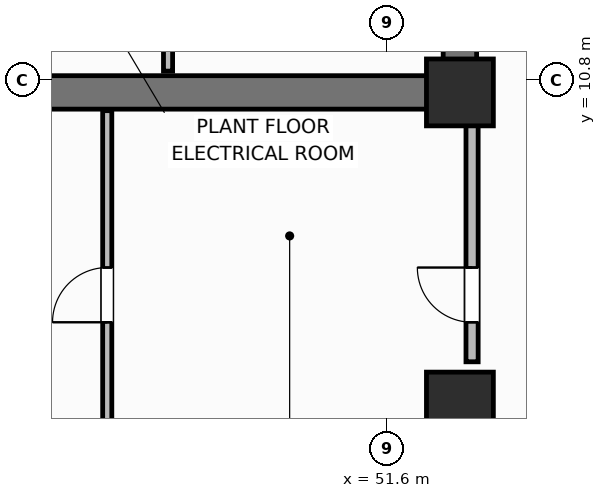
"""IFC4 building model, lengths in metres.
Left out: names, types, materials, properties, quantities, classifications, styles, units other than length and angle.
Written with IfcOpenShell. Run it as: python <this file> out.ifc"""

import sys

from ifc_helpers import new_model, si_unit, direction, frame, frame_2d, origin, origin_2d, place, context, subcontext, project, spatial, rectangle, extrude, element, fill, save


model = new_model("IFC4")
c1 = context("Model", 3, precision=1e-05, world=origin(), true_north=direction((0.0, 1.0)))
c2 = subcontext(c1, "Body", "Model", "MODEL_VIEW")
j1 = project(units=[si_unit("LENGTHUNIT", "METRE"), si_unit("PLANEANGLEUNIT", "RADIAN")], contexts=[c1])
p1 = place(None, origin())
s1 = spatial("IfcSite", under=j1, at=p1, CompositionType="ELEMENT")
p2 = place(p1, origin())
s2 = spatial("IfcBuilding", under=s1, at=p2, CompositionType="ELEMENT")
p3 = place(p2, frame((0.0, 0.0, 129.0)))
s3 = spatial("IfcBuildingStorey", under=s2, at=p3, CompositionType="ELEMENT", Elevation=129.0)
p4 = place(p3, frame((52.8, 10.6, 0.0), z_axis=(0.0, 0.0, 1.0), x_axis=(-1.0, 0.0, 0.0)))
e1 = element("IfcWall", 1, at=p4, inside=s3, PredefinedType="SHEAR", context=c2, shape_type="SweptSolid", body=[
    extrude(rectangle(XDim=27.2, YDim=0.55, at=frame_2d((13.6, 0.0))), origin(), (0.0, 0.0, 1.0), 3.7),
])
p5 = place(p3, frame((52.8, 10.875, 0.0), z_axis=(0.0, 0.0, 1.0), x_axis=(0.0, 1.0, 0.0)))
e2 = element("IfcWall", 2, at=p5, inside=s3, PredefinedType="SHEAR", context=c2, shape_type="SweptSolid", body=[
    extrude(rectangle(XDim=5.65, YDim=0.55, at=frame_2d((2.825, 0.0))), origin(), (0.0, 0.0, 1.0), 3.7),
])
for number, where, z_axis, x_axis in (
    (3, (52.8, 10.6, 0.0), (0.0, 0.0, 1.0), (1.0, 0.0, 0.0)),
    (4, (52.8, 5.45, 0.0), (0.0, 0.0, 1.0), (1.0, 0.0, 0.0)),
):
    element("IfcColumn", number, at=place(p3, frame(where, z_axis=z_axis, x_axis=x_axis)), inside=s3, PredefinedType="COLUMN", context=c2, shape_type="SweptSolid", body=[
        extrude(rectangle(XDim=1.1, YDim=1.1, at=origin_2d()), origin(), (0.0, 0.0, 1.0), 3.7),
    ])
p6 = place(p3, frame((48.0, 10.95, 0.0), z_axis=(0.0, 0.0, 1.0), x_axis=(0.0, 1.0, 0.0)))
e5 = element("IfcWall", 5, at=p6, inside=s3, PredefinedType="PARTITIONING", context=c2, shape_type="SweptSolid", body=[
    extrude(rectangle(XDim=5.63, YDim=0.15, at=frame_2d((2.815, 0.0))), origin(), (0.0, 0.0, 1.0), 2.53),
])
p7 = place(p3, frame((47.0, 4.97, 0.0), z_axis=(0.0, 0.0, 1.0), x_axis=(0.0, 1.0, 0.0)))
e6 = element("IfcWall", 6, at=p7, inside=s3, PredefinedType="PARTITIONING", context=c2, shape_type="SweptSolid", body=[
    extrude(rectangle(XDim=5.33, YDim=0.15, at=frame_2d((2.665, 0.0))), origin(), (0.0, 0.0, 1.0), 2.53),
])
p8 = place(p7, frame((1.85, 0.0, 0.0)))
e7 = element("IfcOpeningElement", 7, at=p8, cuts=e6, PredefinedType="OPENING", context=c2, shape_type="SweptSolid", body=[
    extrude(rectangle(XDim=0.9, YDim=2.1, at=frame_2d((0.45, 1.05))), frame((0.0, 0.085, 0.0), z_axis=(0.0, -1.0, 0.0), x_axis=(1.0, 0.0, 0.0)), (0.0, 0.0, 1.0), 0.17),
])
p9 = place(p3, frame((53.0, 6.17, 0.0), z_axis=(0.0, 0.0, 1.0), x_axis=(0.0, 1.0, 0.0)))
e8 = element("IfcWall", 8, at=p9, inside=s3, PredefinedType="PARTITIONING", context=c2, shape_type="SweptSolid", body=[
    extrude(rectangle(XDim=4.13, YDim=0.2, at=frame_2d((2.065, 0.0))), origin(), (0.0, 0.0, 1.0), 2.53),
])
p10 = place(p9, frame((0.65, 0.0, 0.0)))
e9 = element("IfcOpeningElement", 9, at=p10, cuts=e8, PredefinedType="OPENING", context=c2, shape_type="SweptSolid", body=[
    extrude(rectangle(XDim=0.9, YDim=2.1, at=frame_2d((0.45, 1.05))), frame((0.0, 0.11, 0.0), z_axis=(0.0, -1.0, 0.0), x_axis=(1.0, 0.0, 0.0)), (0.0, 0.0, 1.0), 0.22),
])
p11 = place(p8, origin())
e10 = element("IfcDoor", 10, at=p11, inside=s3, OperationType="SINGLE_SWING_LEFT", PredefinedType="DOOR", context=c2, shape_type="SweptSolid", body=[
    extrude(rectangle(XDim=0.9, YDim=2.1, at=frame_2d((0.45, 1.05))), frame((0.0, 0.025, 0.0), z_axis=(0.0, -1.0, 0.0), x_axis=(1.0, 0.0, 0.0)), (0.0, 0.0, 1.0), 0.05),
])
fill(e7, e10)
p12 = place(p10, origin())
e11 = element("IfcDoor", 11, at=p12, inside=s3, OperationType="SINGLE_SWING_RIGHT", PredefinedType="DOOR", context=c2, shape_type="SweptSolid", body=[
    extrude(rectangle(XDim=0.9, YDim=2.1, at=frame_2d((0.45, 1.05))), frame((0.0, 0.025, 0.0), z_axis=(0.0, -1.0, 0.0), x_axis=(1.0, 0.0, 0.0)), (0.0, 0.0, 1.0), 0.05),
])
fill(e9, e11)
save(model, sys.argv[1])
